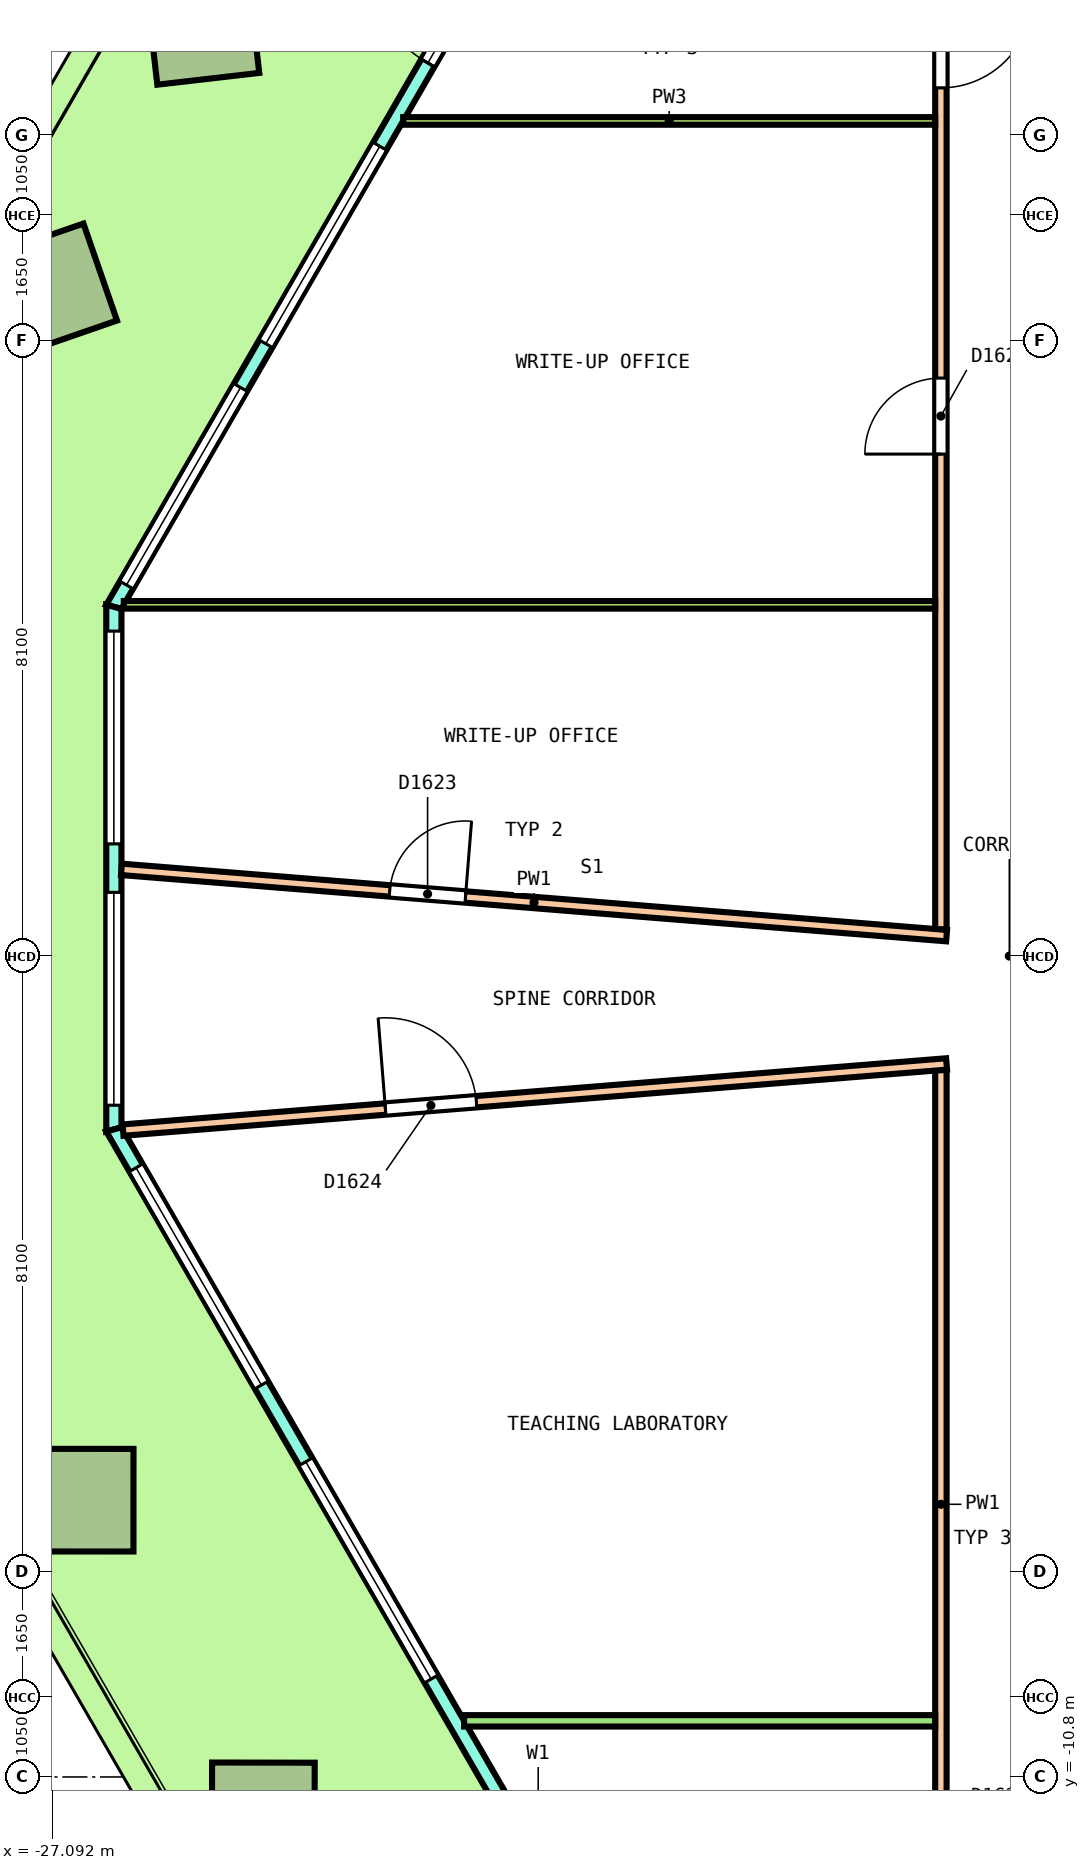
"""IFC4 building model, lengths in metres.
Left out: names, types, materials, properties, quantities, classifications, styles, units other than length and angle.
Written with IfcOpenShell. Run it as: python <this file> out.ifc"""

import sys

from ifc_helpers import new_model, si_unit, direction, frame, frame_2d, origin, origin_2d, place, context, subcontext, project, spatial, polyline, rectangle, outline, extrude, element, fill, save


model = new_model("IFC4")
c1 = context("Model", 3, precision=1e-05, world=origin(), true_north=direction((0.0, 1.0)))
c2 = subcontext(c1, "Body", "Model", "MODEL_VIEW")
j1 = project(units=[si_unit("LENGTHUNIT", "METRE"), si_unit("PLANEANGLEUNIT", "RADIAN")], contexts=[c1])
p1 = place(None, origin())
s1 = spatial("IfcSite", under=j1, at=p1, CompositionType="ELEMENT")
p2 = place(p1, origin())
s2 = spatial("IfcBuilding", under=s1, at=p2, CompositionType="ELEMENT")
p3 = place(p2, frame((0.0, 0.0, 117.6)))
s3 = spatial("IfcBuildingStorey", under=s2, at=p3, CompositionType="ELEMENT", Elevation=117.6)
p4 = place(p3, frame((-25.115, 12.211, 0.0), z_axis=(-0.025427325519, 0.018859603999, 0.999498757605), x_axis=(-0.499709920211, -0.866185204366, 0.003631443371)))
e1 = element("IfcColumn", 1, at=p4, inside=s3, PredefinedType="COLUMN", context=c2, shape_type="SweptSolid", body=[
    extrude(rectangle(XDim=1.35, YDim=1.35, at=origin_2d()), origin(), (0.0, 0.0, 1.0), 4.052),
])
p5 = place(p3, frame((-27.098, 8.778, 0.0), z_axis=(-0.021750699922, 0.025124769716, 0.999447673968), x_axis=(-0.500502376835, -0.865666925982, 0.010869408614)))
e2 = element("IfcColumn", 2, at=p5, inside=s3, PredefinedType="COLUMN", context=c2, shape_type="SweptSolid", body=[
    extrude(rectangle(XDim=1.35, YDim=1.35, at=origin_2d()), origin(), (0.0, 0.0, 1.0), 4.052),
])
p6 = place(p3, frame((-26.698, -7.159, 0.0), z_axis=(-0.010908911174, 0.018864581201, 0.999762533421), x_axis=(0.500186584964, -0.865643404359, 0.021791666111)))
e3 = element("IfcColumn", 3, at=p6, inside=s3, PredefinedType="COLUMN", context=c2, shape_type="SweptSolid", body=[
    extrude(rectangle(XDim=1.35, YDim=1.35, at=origin_2d()), origin(), (0.0, 0.0, 1.0), 4.051),
])
p7 = place(p3, frame((-24.314, -11.286, 0.0), z_axis=(-0.003616977835, 0.006269428248, 0.999973805527), x_axis=(0.498177151135, -0.867045061108, 0.007237962107)))
e4 = element("IfcColumn", 4, at=p7, inside=s3, PredefinedType="COLUMN", context=c2, shape_type="SweptSolid", body=[
    extrude(rectangle(XDim=1.35, YDim=1.35, at=origin_2d()), origin(), (0.0, 0.0, 1.0), 4.05),
])
p8 = place(p3, frame((-17.119, 20.463, 0.0), z_axis=(0.0, 0.0, 1.0), x_axis=(-0.499998099904, -0.866026500803, 0.0)))
e5 = element("IfcWall", 5, at=p8, inside=s3, PredefinedType="SOLIDWALL", context=c2, shape_type="SweptSolid", body=[
    extrude(outline(polyline([(-0.027, -0.1), (0.994, -0.1), (2.015, -0.1), (3.036, -0.1), (4.057, -0.1), (5.078, -0.1), (6.099, -0.1), (7.12, -0.1), (8.141, -0.1), (9.162, -0.1), (10.183, -0.1), (11.204, -0.1), (12.225, -0.1), (13.246, -0.1), (14.267, -0.1), (15.288, -0.1), (16.309, -0.1), (17.33, -0.1), (18.351, -0.1), (18.297, 0.1), (17.282, 0.1), (16.267, 0.1), (15.252, 0.1), (14.237, 0.1), (13.222, 0.1), (12.207, 0.1), (11.192, 0.1), (10.177, 0.1), (9.162, 0.1), (8.147, 0.1), (7.132, 0.1), (6.117, 0.1), (5.102, 0.1), (4.087, 0.1), (3.072, 0.1), (2.057, 0.1), (1.042, 0.1), (0.027, 0.1), (-0.027, -0.1)])), origin(), (0.0, 0.0, 1.0), 4.1),
])
p9 = place(p8, frame((0.333, 0.0, 0.1)))
e6 = element("IfcOpeningElement", 6, at=p9, cuts=e5, PredefinedType="OPENING", context=c2, shape_type="SweptSolid", body=[
    extrude(rectangle(XDim=3.0, YDim=2.9, at=frame_2d((1.5, 1.45))), frame((0.0, 0.11, 0.0), z_axis=(0.0, -1.0, 0.0), x_axis=(1.0, 0.0, 0.0)), (0.0, 0.0, 1.0), 0.22),
])
p10 = place(p8, frame((3.997, 0.0, 0.1)))
e7 = element("IfcOpeningElement", 7, at=p10, cuts=e5, PredefinedType="OPENING", context=c2, shape_type="SweptSolid", body=[
    extrude(rectangle(XDim=3.0, YDim=2.9, at=frame_2d((1.5, 1.45))), frame((0.0, 0.11, 0.0), z_axis=(0.0, -1.0, 0.0), x_axis=(1.0, 0.0, 0.0)), (0.0, 0.0, 1.0), 0.22),
])
p11 = place(p8, frame((8.262, 0.0, 0.0)))
e8 = element("IfcOpeningElement", 8, at=p11, cuts=e5, PredefinedType="OPENING", context=c2, shape_type="SweptSolid", body=[
    extrude(rectangle(XDim=1.8, YDim=2.4, at=frame_2d((0.9, 1.2))), frame((0.0, 0.11, 0.0), z_axis=(0.0, -1.0, 0.0), x_axis=(1.0, 0.0, 0.0)), (0.0, 0.0, 1.0), 0.22),
])
p12 = place(p8, frame((8.262, 0.0, 2.55)))
e9 = element("IfcOpeningElement", 9, at=p12, cuts=e5, PredefinedType="OPENING", context=c2, shape_type="SweptSolid", body=[
    extrude(rectangle(XDim=1.8, YDim=0.45, at=frame_2d((0.9, 0.225))), frame((0.0, 0.11, 0.0), z_axis=(0.0, -1.0, 0.0), x_axis=(1.0, 0.0, 0.0)), (0.0, 0.0, 1.0), 0.22),
])
p13 = place(p8, frame((11.327, 0.0, 0.1)))
e10 = element("IfcOpeningElement", 10, at=p13, cuts=e5, PredefinedType="OPENING", context=c2, shape_type="SweptSolid", body=[
    extrude(rectangle(XDim=3.0, YDim=2.9, at=frame_2d((1.5, 1.45))), frame((0.0, 0.11, 0.0), z_axis=(0.0, -1.0, 0.0), x_axis=(1.0, 0.0, 0.0)), (0.0, 0.0, 1.0), 0.22),
])
p14 = place(p8, frame((14.991, 0.0, 0.1)))
e11 = element("IfcOpeningElement", 11, at=p14, cuts=e5, PredefinedType="OPENING", context=c2, shape_type="SweptSolid", body=[
    extrude(rectangle(XDim=3.0, YDim=2.9, at=frame_2d((1.5, 1.45))), frame((0.0, 0.11, 0.0), z_axis=(0.0, -1.0, 0.0), x_axis=(1.0, 0.0, 0.0)), (0.0, 0.0, 1.0), 0.22),
])
p15 = place(p3, frame((-26.281, 4.594, 0.0), z_axis=(0.0, 0.0, 1.0), x_axis=(0.0, -1.0, 0.0)))
e12 = element("IfcWall", 12, at=p15, inside=s3, PredefinedType="SOLIDWALL", context=c2, shape_type="SweptSolid", body=[
    extrude(outline(polyline([(-0.027, -0.1), (1.128, -0.1), (2.282, -0.1), (3.437, -0.1), (4.592, -0.1), (5.747, -0.1), (6.901, -0.1), (6.848, 0.1), (5.711, 0.1), (4.574, 0.1), (3.437, 0.1), (2.301, 0.1), (1.164, 0.1), (0.027, 0.1), (-0.027, -0.1)])), origin(), (0.0, 0.0, 1.0), 4.1),
])
p16 = place(p15, frame((0.319, 0.0, 0.1)))
e13 = element("IfcOpeningElement", 13, at=p16, cuts=e12, PredefinedType="OPENING", context=c2, shape_type="SweptSolid", body=[
    extrude(rectangle(XDim=2.8, YDim=2.9, at=frame_2d((1.4, 1.45))), frame((0.0, 0.11, 0.0), z_axis=(0.0, -1.0, 0.0), x_axis=(1.0, 0.0, 0.0)), (0.0, 0.0, 1.0), 0.22),
])
p17 = place(p15, frame((3.756, 0.0, 0.1)))
e14 = element("IfcOpeningElement", 14, at=p17, cuts=e12, PredefinedType="OPENING", context=c2, shape_type="SweptSolid", body=[
    extrude(rectangle(XDim=2.8, YDim=2.9, at=frame_2d((1.4, 1.45))), frame((0.0, 0.11, 0.0), z_axis=(0.0, -1.0, 0.0), x_axis=(1.0, 0.0, 0.0)), (0.0, 0.0, 1.0), 0.22),
])
p18 = place(p3, frame((-26.281, -2.281, 0.0), z_axis=(0.0, 0.0, 1.0), x_axis=(0.500000698452, -0.866025000533, 0.0)))
e15 = element("IfcWall", 15, at=p18, inside=s3, PredefinedType="SOLIDWALL", context=c2, shape_type="SweptSolid", body=[
    extrude(outline(polyline([(-0.027, -0.1), (0.99, -0.1), (2.008, -0.1), (3.025, -0.1), (4.043, -0.1), (5.06, -0.1), (6.078, -0.1), (7.095, -0.1), (8.113, -0.1), (9.13, -0.1), (10.148, -0.1), (11.165, -0.1), (12.182, -0.1), (13.2, -0.1), (14.217, -0.1), (15.235, -0.1), (16.252, -0.1), (17.27, -0.1), (18.287, -0.1), (19.305, -0.1), (20.322, -0.1), (21.34, -0.1), (22.357, -0.1), (22.303, 0.1), (21.291, 0.1), (20.278, 0.1), (19.266, 0.1), (18.253, 0.1), (17.24, 0.1), (16.228, 0.1), (15.215, 0.1), (14.203, 0.1), (13.19, 0.1), (12.177, 0.1), (11.165, 0.1), (10.153, 0.1), (9.14, 0.1), (8.127, 0.1), (7.115, 0.1), (6.102, 0.1), (5.09, 0.1), (4.077, 0.1), (3.064, 0.1), (2.052, 0.1), (1.039, 0.1), (0.027, 0.1), (-0.027, -0.1)])), origin(), (0.0, 0.0, 1.0), 4.1),
])
p19 = place(p18, frame((0.583, 0.0, 0.1)))
e16 = element("IfcOpeningElement", 16, at=p19, cuts=e15, PredefinedType="OPENING", context=c2, shape_type="SweptSolid", body=[
    extrude(rectangle(XDim=3.3, YDim=2.9, at=frame_2d((1.65, 1.45))), frame((0.0, 0.11, 0.0), z_axis=(0.0, -1.0, 0.0), x_axis=(1.0, 0.0, 0.0)), (0.0, 0.0, 1.0), 0.22),
])
p20 = place(p18, frame((5.049, 0.0, 0.1)))
e17 = element("IfcOpeningElement", 17, at=p20, cuts=e15, PredefinedType="OPENING", context=c2, shape_type="SweptSolid", body=[
    extrude(rectangle(XDim=3.3, YDim=2.9, at=frame_2d((1.65, 1.45))), frame((0.0, 0.11, 0.0), z_axis=(0.0, -1.0, 0.0), x_axis=(1.0, 0.0, 0.0)), (0.0, 0.0, 1.0), 0.22),
])
p21 = place(p18, frame((10.265, 0.0, 0.0)))
e18 = element("IfcOpeningElement", 18, at=p21, cuts=e15, PredefinedType="OPENING", context=c2, shape_type="SweptSolid", body=[
    extrude(rectangle(XDim=1.8, YDim=2.4, at=frame_2d((0.9, 1.2))), frame((0.0, 0.11, 0.0), z_axis=(0.0, -1.0, 0.0), x_axis=(1.0, 0.0, 0.0)), (0.0, 0.0, 1.0), 0.22),
])
p22 = place(p18, frame((10.265, 0.0, 2.55)))
e19 = element("IfcOpeningElement", 19, at=p22, cuts=e15, PredefinedType="OPENING", context=c2, shape_type="SweptSolid", body=[
    extrude(rectangle(XDim=1.8, YDim=0.45, at=frame_2d((0.9, 0.225))), frame((0.0, 0.11, 0.0), z_axis=(0.0, -1.0, 0.0), x_axis=(1.0, 0.0, 0.0)), (0.0, 0.0, 1.0), 0.22),
])
p23 = place(p18, frame((13.981, 0.0, 0.1)))
e20 = element("IfcOpeningElement", 20, at=p23, cuts=e15, PredefinedType="OPENING", context=c2, shape_type="SweptSolid", body=[
    extrude(rectangle(XDim=3.3, YDim=2.9, at=frame_2d((1.65, 1.45))), frame((0.0, 0.11, 0.0), z_axis=(0.0, -1.0, 0.0), x_axis=(1.0, 0.0, 0.0)), (0.0, 0.0, 1.0), 0.22),
])
p24 = place(p18, frame((18.447, 0.0, 0.1)))
e21 = element("IfcOpeningElement", 21, at=p24, cuts=e15, PredefinedType="OPENING", context=c2, shape_type="SweptSolid", body=[
    extrude(rectangle(XDim=3.3, YDim=2.9, at=frame_2d((1.65, 1.45))), frame((0.0, 0.11, 0.0), z_axis=(0.0, -1.0, 0.0), x_axis=(1.0, 0.0, 0.0)), (0.0, 0.0, 1.0), 0.22),
])
p25 = place(p3, frame((-15.4, -12.925, 0.0), z_axis=(0.0, 0.0, 1.0), x_axis=(0.0, 1.0, 0.0)))
e22 = element("IfcWall", 22, at=p25, inside=s3, PredefinedType="PARTITIONING", context=c2, shape_type="SweptSolid", body=[
    extrude(rectangle(XDim=11.425, YDim=0.15, at=frame_2d((5.712, 0.0))), origin(), (0.0, 0.0, 1.0), 3.05),
])
p26 = place(p25, frame((0.585, 0.0, 0.0)))
e23 = element("IfcOpeningElement", 23, at=p26, cuts=e22, PredefinedType="OPENING", context=c2, shape_type="SweptSolid", body=[
    extrude(rectangle(XDim=1.0, YDim=2.1, at=frame_2d((0.5, 1.05))), frame((0.0, 0.085, 0.0), z_axis=(0.0, -1.0, 0.0), x_axis=(1.0, 0.0, 0.0)), (0.0, 0.0, 1.0), 0.17),
])
p27 = place(p3, frame((-15.4, 0.349, 0.0), z_axis=(0.0, 0.0, 1.0), x_axis=(0.0, 1.0, 0.0)))
e24 = element("IfcWall", 24, at=p27, inside=s3, PredefinedType="PARTITIONING", context=c2, shape_type="SweptSolid", body=[
    extrude(rectangle(XDim=12.726, YDim=0.15, at=frame_2d((6.363, 0.0))), origin(), (0.0, 0.0, 1.0), 3.05),
])
p28 = place(p27, frame((11.072, 0.0, 0.0)))
e25 = element("IfcOpeningElement", 25, at=p28, cuts=e24, PredefinedType="OPENING", context=c2, shape_type="SweptSolid", body=[
    extrude(rectangle(XDim=1.2, YDim=2.1, at=frame_2d((0.6, 1.05))), frame((0.0, 0.085, 0.0), z_axis=(0.0, -1.0, 0.0), x_axis=(1.0, 0.0, 0.0)), (0.0, 0.0, 1.0), 0.17),
])
p29 = place(p27, frame((6.254, 0.0, 0.0)))
e26 = element("IfcOpeningElement", 26, at=p29, cuts=e24, PredefinedType="OPENING", context=c2, shape_type="SweptSolid", body=[
    extrude(rectangle(XDim=1.0, YDim=2.1, at=frame_2d((0.5, 1.05))), frame((0.0, 0.085, 0.0), z_axis=(0.0, -1.0, 0.0), x_axis=(1.0, 0.0, 0.0)), (0.0, 0.0, 1.0), 0.17),
])
p30 = place(p3, frame((-26.18, 1.14, 0.0), z_axis=(0.0, 0.0, 1.0), x_axis=(0.996788563133, -0.08007846406, 0.0)))
e27 = element("IfcWall", 27, at=p30, inside=s3, PredefinedType="PARTITIONING", context=c2, shape_type="SweptSolid", body=[
    extrude(rectangle(XDim=10.89, YDim=0.15, at=frame_2d((5.445, 0.0))), origin(), (0.0, 0.0, 1.0), 3.05),
])
p31 = place(p30, frame((3.54, 0.0, 0.0)))
e28 = element("IfcOpeningElement", 28, at=p31, cuts=e27, PredefinedType="OPENING", context=c2, shape_type="SweptSolid", body=[
    extrude(rectangle(XDim=1.0, YDim=2.1, at=frame_2d((0.5, 1.05))), frame((0.0, 0.085, 0.0), z_axis=(0.0, -1.0, 0.0), x_axis=(1.0, 0.0, 0.0)), (0.0, 0.0, 1.0), 0.17),
])
p32 = place(p3, frame((-26.16, -2.29, 0.0), z_axis=(0.0, 0.0, 1.0), x_axis=(0.996790806926, 0.080050529212, 0.0)))
e29 = element("IfcWall", 29, at=p32, inside=s3, PredefinedType="PARTITIONING", context=c2, shape_type="SweptSolid", body=[
    extrude(rectangle(XDim=10.87, YDim=0.15, at=frame_2d((5.435, 0.0))), origin(), (0.0, 0.0, 1.0), 3.05),
])
p33 = place(p32, frame((3.463, 0.0, 0.0)))
e30 = element("IfcOpeningElement", 30, at=p33, cuts=e29, PredefinedType="OPENING", context=c2, shape_type="SweptSolid", body=[
    extrude(rectangle(XDim=1.2, YDim=2.1, at=frame_2d((0.6, 1.05))), frame((0.0, 0.085, 0.0), z_axis=(0.0, -1.0, 0.0), x_axis=(1.0, 0.0, 0.0)), (0.0, 0.0, 1.0), 0.17),
])
p34 = place(p3, frame((-21.673, -10.062, 0.0), z_axis=(0.0, 0.0, 1.0), x_axis=(1.0, 0.0, 0.0)))
e31 = element("IfcWall", 31, at=p34, inside=s3, PredefinedType="PARTITIONING", context=c2, shape_type="SweptSolid", body=[
    extrude(rectangle(XDim=6.198, YDim=0.15, at=frame_2d((3.099, 0.0))), origin(), (0.0, 0.0, 1.0), 3.05),
])
p35 = place(p3, frame((-26.15, 4.621, 0.0), z_axis=(0.0, 0.0, 1.0), x_axis=(1.0, 0.0, 0.0)))
e32 = element("IfcWall", 32, at=p35, inside=s3, PredefinedType="PARTITIONING", context=c2, shape_type="SweptSolid", body=[
    extrude(rectangle(XDim=10.675, YDim=0.1, at=frame_2d((5.337, 0.0))), origin(), (0.0, 0.0, 1.0), 3.05),
])
p36 = place(p3, frame((-22.474, 10.987, 0.0), z_axis=(0.0, 0.0, 1.0), x_axis=(1.0, 0.0, 0.0)))
e33 = element("IfcWall", 33, at=p36, inside=s3, PredefinedType="PARTITIONING", context=c2, shape_type="SweptSolid", body=[
    extrude(rectangle(XDim=6.999, YDim=0.1, at=frame_2d((3.5, 0.0))), origin(), (0.0, 0.0, 1.0), 3.05),
])
p37 = place(p11, origin())
e34 = element("IfcDoor", 34, at=p37, inside=s3, OperationType="DOUBLE_DOOR_SINGLE_SWING", PredefinedType="DOOR", context=c2, shape_type="SweptSolid", body=[
    extrude(rectangle(XDim=1.8, YDim=2.4, at=frame_2d((0.9, 1.2))), frame((0.0, 0.025, 0.0), z_axis=(0.0, -1.0, 0.0), x_axis=(1.0, 0.0, 0.0)), (0.0, 0.0, 1.0), 0.05),
])
fill(e8, e34)
p38 = place(p12, origin())
e35 = element("IfcWindow", 35, at=p38, inside=s3, PartitioningType="SINGLE_PANEL", PredefinedType="WINDOW", context=c2, shape_type="SweptSolid", body=[
    extrude(rectangle(XDim=1.8, YDim=0.45, at=frame_2d((0.9, 0.225))), frame((0.0, 0.03, 0.0), z_axis=(0.0, -1.0, 0.0), x_axis=(1.0, 0.0, 0.0)), (0.0, 0.0, 1.0), 0.06),
])
fill(e9, e35)
p39 = place(p13, origin())
e36 = element("IfcWindow", 36, at=p39, inside=s3, PartitioningType="SINGLE_PANEL", PredefinedType="WINDOW", context=c2, shape_type="SweptSolid", body=[
    extrude(rectangle(XDim=3.0, YDim=2.9, at=frame_2d((1.5, 1.45))), frame((0.0, 0.03, 0.0), z_axis=(0.0, -1.0, 0.0), x_axis=(1.0, 0.0, 0.0)), (0.0, 0.0, 1.0), 0.06),
])
fill(e10, e36)
p40 = place(p14, origin())
e37 = element("IfcWindow", 37, at=p40, inside=s3, PartitioningType="SINGLE_PANEL", PredefinedType="WINDOW", context=c2, shape_type="SweptSolid", body=[
    extrude(rectangle(XDim=3.0, YDim=2.9, at=frame_2d((1.5, 1.45))), frame((0.0, 0.03, 0.0), z_axis=(0.0, -1.0, 0.0), x_axis=(1.0, 0.0, 0.0)), (0.0, 0.0, 1.0), 0.06),
])
fill(e11, e37)
p41 = place(p16, origin())
e38 = element("IfcWindow", 38, at=p41, inside=s3, PartitioningType="SINGLE_PANEL", PredefinedType="WINDOW", context=c2, shape_type="SweptSolid", body=[
    extrude(rectangle(XDim=2.8, YDim=2.9, at=frame_2d((1.4, 1.45))), frame((0.0, 0.03, 0.0), z_axis=(0.0, -1.0, 0.0), x_axis=(1.0, 0.0, 0.0)), (0.0, 0.0, 1.0), 0.06),
])
fill(e13, e38)
p42 = place(p17, origin())
e39 = element("IfcWindow", 39, at=p42, inside=s3, PartitioningType="SINGLE_PANEL", PredefinedType="WINDOW", context=c2, shape_type="SweptSolid", body=[
    extrude(rectangle(XDim=2.8, YDim=2.9, at=frame_2d((1.4, 1.45))), frame((0.0, 0.03, 0.0), z_axis=(0.0, -1.0, 0.0), x_axis=(1.0, 0.0, 0.0)), (0.0, 0.0, 1.0), 0.06),
])
fill(e14, e39)
p43 = place(p19, origin())
e40 = element("IfcWindow", 40, at=p43, inside=s3, PartitioningType="SINGLE_PANEL", PredefinedType="WINDOW", context=c2, shape_type="SweptSolid", body=[
    extrude(rectangle(XDim=3.3, YDim=2.9, at=frame_2d((1.65, 1.45))), frame((0.0, 0.03, 0.0), z_axis=(0.0, -1.0, 0.0), x_axis=(1.0, 0.0, 0.0)), (0.0, 0.0, 1.0), 0.06),
])
fill(e16, e40)
p44 = place(p20, origin())
e41 = element("IfcWindow", 41, at=p44, inside=s3, PartitioningType="SINGLE_PANEL", PredefinedType="WINDOW", context=c2, shape_type="SweptSolid", body=[
    extrude(rectangle(XDim=3.3, YDim=2.9, at=frame_2d((1.65, 1.45))), frame((0.0, 0.03, 0.0), z_axis=(0.0, -1.0, 0.0), x_axis=(1.0, 0.0, 0.0)), (0.0, 0.0, 1.0), 0.06),
])
fill(e17, e41)
p45 = place(p28, origin())
e42 = element("IfcDoor", 42, at=p45, inside=s3, OperationType="DOUBLE_DOOR_SINGLE_SWING", PredefinedType="DOOR", context=c2, shape_type="SweptSolid", body=[
    extrude(rectangle(XDim=1.2, YDim=2.1, at=frame_2d((0.6, 1.05))), frame((0.0, 0.025, 0.0), z_axis=(0.0, -1.0, 0.0), x_axis=(1.0, 0.0, 0.0)), (0.0, 0.0, 1.0), 0.05),
])
fill(e25, e42)
p46 = place(p29, origin())
e43 = element("IfcDoor", 43, at=p46, inside=s3, OperationType="SINGLE_SWING_RIGHT", PredefinedType="DOOR", context=c2, shape_type="SweptSolid", body=[
    extrude(rectangle(XDim=1.0, YDim=2.1, at=frame_2d((0.5, 1.05))), frame((0.0, 0.025, 0.0), z_axis=(0.0, -1.0, 0.0), x_axis=(1.0, 0.0, 0.0)), (0.0, 0.0, 1.0), 0.05),
])
fill(e26, e43)
p47 = place(p31, origin())
e44 = element("IfcDoor", 44, at=p47, inside=s3, OperationType="SINGLE_SWING_LEFT", PredefinedType="DOOR", context=c2, shape_type="SweptSolid", body=[
    extrude(rectangle(XDim=1.0, YDim=2.1, at=frame_2d((0.5, 1.05))), frame((0.0, 0.025, 0.0), z_axis=(0.0, -1.0, 0.0), x_axis=(1.0, 0.0, 0.0)), (0.0, 0.0, 1.0), 0.05),
])
fill(e28, e44)
p48 = place(p33, origin())
e45 = element("IfcDoor", 45, at=p48, inside=s3, OperationType="DOUBLE_DOOR_SINGLE_SWING", PredefinedType="DOOR", context=c2, shape_type="SweptSolid", body=[
    extrude(rectangle(XDim=1.2, YDim=2.1, at=frame_2d((0.6, 1.05))), frame((0.0, 0.025, 0.0), z_axis=(0.0, -1.0, 0.0), x_axis=(1.0, 0.0, 0.0)), (0.0, 0.0, 1.0), 0.05),
])
fill(e30, e45)
save(model, sys.argv[1])
